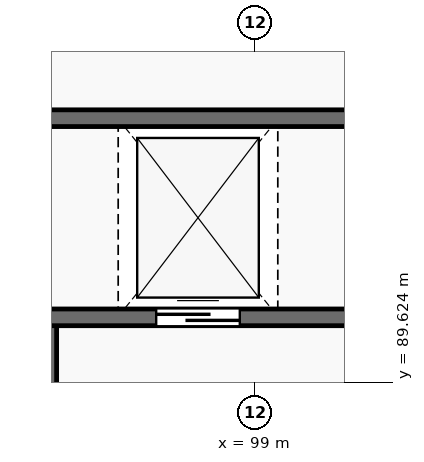
"""IFC4 building model, lengths in metres.
Left out: names, types, materials, properties, quantities, classifications, styles, units other than length and angle.
Written with IfcOpenShell. Run it as: python <this file> out.ifc"""

import sys

from ifc_helpers import new_model, si_unit, direction, frame, frame_2d, origin, place, context, subcontext, project, spatial, rectangle, extrude, element, fill, save


model = new_model("IFC4")
c1 = context("Model", 3, precision=1e-05, world=origin(), true_north=direction((0.0, 1.0)))
c2 = subcontext(c1, "Body", "Model", "MODEL_VIEW")
j1 = project(units=[si_unit("LENGTHUNIT", "METRE"), si_unit("PLANEANGLEUNIT", "RADIAN")], contexts=[c1])
p1 = place(None, origin())
s1 = spatial("IfcSite", under=j1, at=p1, CompositionType="ELEMENT")
p2 = place(p1, origin())
s2 = spatial("IfcBuilding", under=s1, at=p2, CompositionType="ELEMENT")
p3 = place(p2, frame((0.0, 0.0, 10.8)))
s3 = spatial("IfcBuildingStorey", under=s2, at=p3, CompositionType="ELEMENT", Elevation=10.8)
p4 = place(p3, frame((96.27, 86.4, 0.0), z_axis=(0.0, 0.0, 1.0), x_axis=(0.0, 1.0, 0.0)))
e1 = element("IfcWall", 1, at=p4, inside=s3, PredefinedType="SHEAR", context=c2, shape_type="SweptSolid", body=[
    extrude(rectangle(XDim=4.0, YDim=0.24, at=frame_2d((2.0, 0.0))), origin(), (0.0, 0.0, 1.0), 4.2),
])
p5 = place(p4, frame((1.3, 0.0, 0.0)))
e2 = element("IfcOpeningElement", 2, at=p5, cuts=e1, PredefinedType="OPENING", context=c2, shape_type="SweptSolid", body=[
    extrude(rectangle(XDim=1.4, YDim=2.2, at=frame_2d((0.7, 1.1))), frame((0.0, 0.135, 0.0), z_axis=(0.0, -1.0, 0.0), x_axis=(1.0, 0.0, 0.0)), (0.0, 0.0, 1.0), 0.27),
])
p6 = place(p3, frame((96.17, 90.48, 0.0), z_axis=(0.0, 0.0, 1.0), x_axis=(1.0, 0.0, 0.0)))
e3 = element("IfcWall", 3, at=p6, inside=s3, PredefinedType="SHEAR", context=c2, shape_type="SweptSolid", body=[
    extrude(rectangle(XDim=4.16, YDim=0.22, at=frame_2d((2.08, 0.0))), origin(), (0.0, 0.0, 1.0), 4.2),
])
p7 = place(p6, frame((1.53, 0.0, 0.0)))
e4 = element("IfcOpeningElement", 4, at=p7, cuts=e3, PredefinedType="OPENING", context=c2, shape_type="SweptSolid", body=[
    extrude(rectangle(XDim=1.1, YDim=2.15, at=frame_2d((0.55, 1.075))), frame((0.0, 0.125, 0.0), z_axis=(0.0, -1.0, 0.0), x_axis=(1.0, 0.0, 0.0)), (0.0, 0.0, 1.0), 0.25),
])
p8 = place(p3, frame((96.17, 93.1, 0.0), z_axis=(0.0, 0.0, 1.0), x_axis=(1.0, 0.0, 0.0)))
e5 = element("IfcWall", 5, at=p8, inside=s3, PredefinedType="SHEAR", context=c2, shape_type="SweptSolid", body=[
    extrude(rectangle(XDim=4.16, YDim=0.22, at=frame_2d((2.08, 0.0))), origin(), (0.0, 0.0, 1.0), 4.2),
])
p9 = place(p7, origin())
e6 = element("IfcDoor", 6, at=p9, inside=s3, OperationType="SLIDING_TO_RIGHT", PredefinedType="DOOR", context=c2, shape_type="SweptSolid", body=[
    extrude(rectangle(XDim=1.1, YDim=2.15, at=frame_2d((0.55, 1.075))), frame((0.0, 0.025, 0.0), z_axis=(0.0, -1.0, 0.0), x_axis=(1.0, 0.0, 0.0)), (0.0, 0.0, 1.0), 0.05),
])
fill(e4, e6)
save(model, sys.argv[1])
